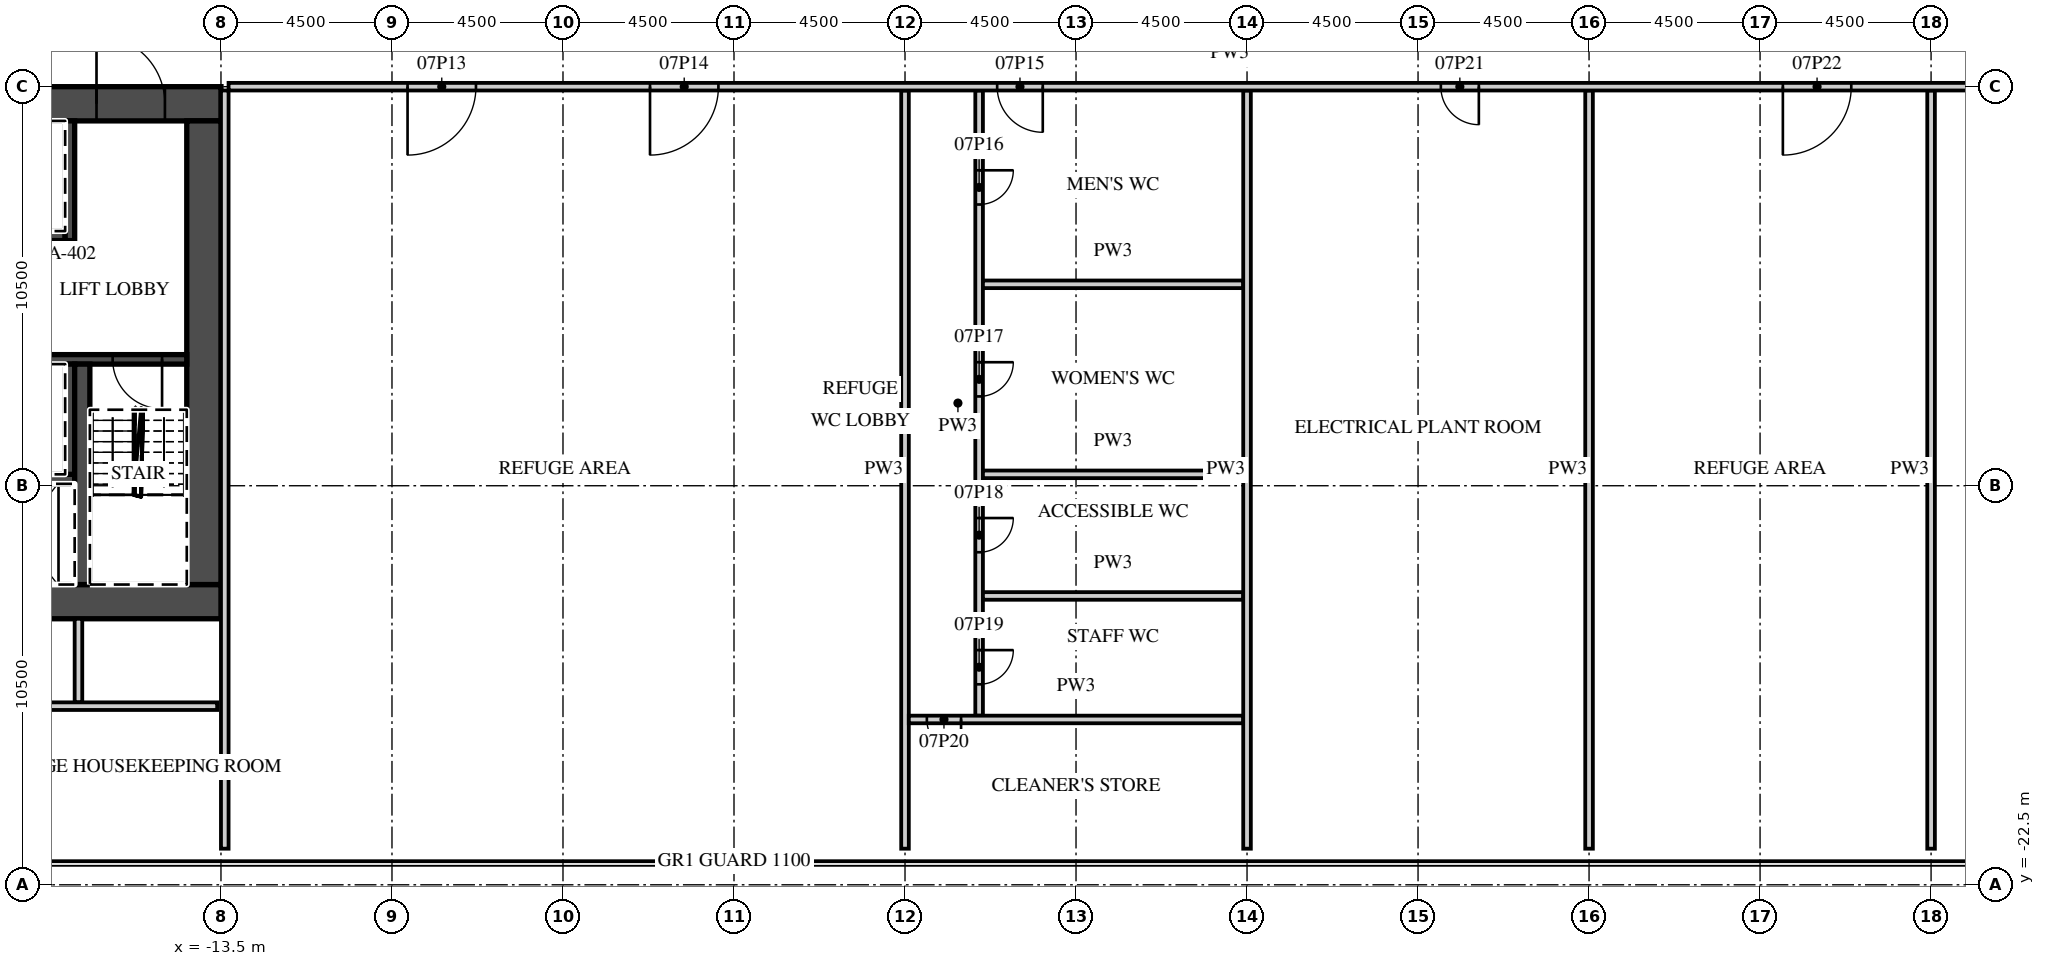
"""IFC4 building model, lengths in metres.
Left out: names, types, materials, properties, quantities, classifications, styles, units other than length and angle.
Written with IfcOpenShell. Run it as: python <this file> out.ifc"""

import sys

from ifc_helpers import new_model, si_unit, direction, frame, frame_2d, origin, place, context, subcontext, project, spatial, rectangle, extrude, element, fill, save


model = new_model("IFC4")
c1 = context("Model", 3, precision=1e-05, world=origin(), true_north=direction((0.0, 1.0)))
c2 = subcontext(c1, "Body", "Model", "MODEL_VIEW")
j1 = project(units=[si_unit("LENGTHUNIT", "METRE"), si_unit("PLANEANGLEUNIT", "RADIAN")], contexts=[c1])
p1 = place(None, origin())
s1 = spatial("IfcSite", under=j1, at=p1, CompositionType="ELEMENT")
p2 = place(p1, origin())
s2 = spatial("IfcBuilding", under=s1, at=p2, CompositionType="ELEMENT")
p3 = place(p2, frame((0.0, 0.0, 47.0)))
s3 = spatial("IfcBuildingStorey", under=s2, at=p3, CompositionType="ELEMENT", Elevation=47.0)
p4 = place(p3, frame((-31.5, -1.95, 0.0), z_axis=(0.0, 0.0, 1.0), x_axis=(1.0, 0.0, 0.0)))
e1 = element("IfcWall", 1, at=p4, inside=s3, PredefinedType="SHEAR", context=c2, shape_type="SweptSolid", body=[
    extrude(rectangle(XDim=18.0, YDim=0.9, at=frame_2d((9.0, 0.0))), origin(), (0.0, 0.0, 1.0), 5.6),
])
p5 = place(p4, frame((14.725, 0.0, 0.0)))
e2 = element("IfcOpeningElement", 2, at=p5, cuts=e1, PredefinedType="OPENING", context=c2, shape_type="SweptSolid", body=[
    extrude(rectangle(XDim=1.8, YDim=2.1, at=frame_2d((0.9, 1.05))), frame((0.0, 0.46, 0.0), z_axis=(0.0, -1.0, 0.0), x_axis=(1.0, 0.0, 0.0)), (0.0, 0.0, 1.0), 0.92),
])
p6 = place(p3, frame((-20.3, -15.05, 0.0), z_axis=(0.0, 0.0, 1.0), x_axis=(1.0, 0.0, 0.0)))
e3 = element("IfcWall", 3, at=p6, inside=s3, PredefinedType="SHEAR", context=c2, shape_type="SweptSolid", body=[
    extrude(rectangle(XDim=6.8, YDim=0.9, at=frame_2d((3.4, 0.0))), origin(), (0.0, 0.0, 1.0), 5.6),
])
p7 = place(p6, frame((0.875, 0.0, 0.0)))
e4 = element("IfcOpeningElement", 4, at=p7, cuts=e3, PredefinedType="OPENING", context=c2, shape_type="SweptSolid", body=[
    extrude(rectangle(XDim=1.2, YDim=2.1, at=frame_2d((0.6, 1.05))), frame((0.0, 0.46, 0.0), z_axis=(0.0, -1.0, 0.0), x_axis=(1.0, 0.0, 0.0)), (0.0, 0.0, 1.0), 0.92),
])
p8 = place(p3, frame((-13.95, -14.6, 0.0), z_axis=(0.0, 0.0, 1.0), x_axis=(0.0, 1.0, 0.0)))
e5 = element("IfcWall", 5, at=p8, inside=s3, PredefinedType="SHEAR", context=c2, shape_type="SweptSolid", body=[
    extrude(rectangle(XDim=12.2, YDim=0.9, at=frame_2d((6.1, 0.0))), origin(), (0.0, 0.0, 1.0), 5.6),
])
p9 = place(p3, frame((-30.6, -5.425, 0.0), z_axis=(0.0, 0.0, 1.0), x_axis=(1.0, 0.0, 0.0)))
e6 = element("IfcWall", 6, at=p9, inside=s3, PredefinedType="SHEAR", context=c2, shape_type="SweptSolid", body=[
    extrude(rectangle(XDim=13.0, YDim=0.25, at=frame_2d((6.5, 0.0))), origin(), (0.0, 0.0, 1.0), 5.6),
])
p10 = place(p3, frame((-17.475, -5.55, 0.0), z_axis=(0.0, 0.0, 1.0), x_axis=(0.0, 1.0, 0.0)))
e7 = element("IfcWall", 7, at=p10, inside=s3, PredefinedType="SHEAR", context=c2, shape_type="SweptSolid", body=[
    extrude(rectangle(XDim=3.15, YDim=0.25, at=frame_2d((1.575, 0.0))), origin(), (0.0, 0.0, 1.0), 5.6),
])
p11 = place(p3, frame((-30.6, -8.675, 0.0), z_axis=(0.0, 0.0, 1.0), x_axis=(1.0, 0.0, 0.0)))
e8 = element("IfcWall", 8, at=p11, inside=s3, PredefinedType="SHEAR", context=c2, shape_type="SweptSolid", body=[
    extrude(rectangle(XDim=16.2, YDim=0.25, at=frame_2d((8.1, 0.0))), origin(), (0.0, 0.0, 1.0), 5.6),
])
p12 = place(p11, frame((0.6, 0.0, 0.0)))
e9 = element("IfcOpeningElement", 9, at=p12, cuts=e8, PredefinedType="OPENING", context=c2, shape_type="SweptSolid", body=[
    extrude(rectangle(XDim=1.2, YDim=2.1, at=frame_2d((0.6, 1.05))), frame((0.0, 0.135, 0.0), z_axis=(0.0, -1.0, 0.0), x_axis=(1.0, 0.0, 0.0)), (0.0, 0.0, 1.0), 0.27),
])
p13 = place(p11, frame((3.25, 0.0, 0.0)))
e10 = element("IfcOpeningElement", 10, at=p13, cuts=e8, PredefinedType="OPENING", context=c2, shape_type="SweptSolid", body=[
    extrude(rectangle(XDim=1.2, YDim=2.1, at=frame_2d((0.6, 1.05))), frame((0.0, 0.135, 0.0), z_axis=(0.0, -1.0, 0.0), x_axis=(1.0, 0.0, 0.0)), (0.0, 0.0, 1.0), 0.27),
])
p14 = place(p11, frame((5.9, 0.0, 0.0)))
e11 = element("IfcOpeningElement", 11, at=p14, cuts=e8, PredefinedType="OPENING", context=c2, shape_type="SweptSolid", body=[
    extrude(rectangle(XDim=1.2, YDim=2.1, at=frame_2d((0.6, 1.05))), frame((0.0, 0.135, 0.0), z_axis=(0.0, -1.0, 0.0), x_axis=(1.0, 0.0, 0.0)), (0.0, 0.0, 1.0), 0.27),
])
p15 = place(p11, frame((14.25, 0.0, 0.0)))
e12 = element("IfcOpeningElement", 12, at=p15, cuts=e8, PredefinedType="OPENING", context=c2, shape_type="SweptSolid", body=[
    extrude(rectangle(XDim=1.3, YDim=2.1, at=frame_2d((0.65, 1.05))), frame((0.0, 0.135, 0.0), z_axis=(0.0, -1.0, 0.0), x_axis=(1.0, 0.0, 0.0)), (0.0, 0.0, 1.0), 0.27),
])
p16 = place(p3, frame((-30.6, -11.825, 0.0), z_axis=(0.0, 0.0, 1.0), x_axis=(1.0, 0.0, 0.0)))
e13 = element("IfcWall", 13, at=p16, inside=s3, PredefinedType="SHEAR", context=c2, shape_type="SweptSolid", body=[
    extrude(rectangle(XDim=13.25, YDim=0.25, at=frame_2d((6.625, 0.0))), origin(), (0.0, 0.0, 1.0), 5.6),
])
p17 = place(p3, frame((-17.475, -11.7, 0.0), z_axis=(0.0, 0.0, 1.0), x_axis=(0.0, 1.0, 0.0)))
e14 = element("IfcWall", 14, at=p17, inside=s3, PredefinedType="SHEAR", context=c2, shape_type="SweptSolid", body=[
    extrude(rectangle(XDim=2.9, YDim=0.25, at=frame_2d((1.45, 0.0))), origin(), (0.0, 0.0, 1.0), 5.6),
])
p18 = place(p3, frame((-17.15, -14.6, 0.0), z_axis=(0.0, 0.0, 1.0), x_axis=(0.0, 1.0, 0.0)))
e15 = element("IfcWall", 15, at=p18, inside=s3, PredefinedType="SHEAR", context=c2, shape_type="SweptSolid", body=[
    extrude(rectangle(XDim=5.8, YDim=0.4, at=frame_2d((2.9, 0.0))), origin(), (0.0, 0.0, 1.0), 5.6),
])
p19 = place(p3, frame((-17.25, -17.7, 0.0), z_axis=(0.0, 0.0, 1.0), x_axis=(0.0, 1.0, 0.0)))
e16 = element("IfcWall", 16, at=p19, inside=s3, PredefinedType="PARTITIONING", context=c2, shape_type="SweptSolid", body=[
    extrude(rectangle(XDim=2.2, YDim=0.2, at=frame_2d((1.1, 0.0))), origin(), (0.0, 0.0, 1.0), 5.6),
])
p20 = place(p3, frame((-44.55, -17.8, 0.0), z_axis=(0.0, 0.0, 1.0), x_axis=(1.0, 0.0, 0.0)))
e17 = element("IfcWall", 17, at=p20, inside=s3, PredefinedType="PARTITIONING", context=c2, shape_type="SweptSolid", body=[
    extrude(rectangle(XDim=30.95, YDim=0.2, at=frame_2d((15.475, 0.0))), origin(), (0.0, 0.0, 1.0), 5.6),
])
p21 = place(p20, frame((12.238, 0.0, 0.0)))
e18 = element("IfcOpeningElement", 18, at=p21, cuts=e17, PredefinedType="OPENING", context=c2, shape_type="SweptSolid", body=[
    extrude(rectangle(XDim=0.9, YDim=2.1, at=frame_2d((0.45, 1.05))), frame((0.0, 0.11, 0.0), z_axis=(0.0, -1.0, 0.0), x_axis=(1.0, 0.0, 0.0)), (0.0, 0.0, 1.0), 0.22),
])
p22 = place(p20, frame((20.538, 0.0, 0.0)))
e19 = element("IfcOpeningElement", 19, at=p22, cuts=e17, PredefinedType="OPENING", context=c2, shape_type="SweptSolid", body=[
    extrude(rectangle(XDim=0.9, YDim=2.1, at=frame_2d((0.45, 1.05))), frame((0.0, 0.11, 0.0), z_axis=(0.0, -1.0, 0.0), x_axis=(1.0, 0.0, 0.0)), (0.0, 0.0, 1.0), 0.22),
])
p23 = place(p3, frame((4.5, -21.55, 0.0), z_axis=(0.0, 0.0, 1.0), x_axis=(0.0, 1.0, 0.0)))
e20 = element("IfcWall", 20, at=p23, inside=s3, PredefinedType="PARTITIONING", context=c2, shape_type="SweptSolid", body=[
    extrude(rectangle(XDim=19.95, YDim=0.2, at=frame_2d((9.975, 0.0))), origin(), (0.0, 0.0, 1.0), 5.6),
])
p24 = place(p3, frame((6.45, -18.05, 0.0), z_axis=(0.0, 0.0, 1.0), x_axis=(0.0, 1.0, 0.0)))
e21 = element("IfcWall", 21, at=p24, inside=s3, PredefinedType="PARTITIONING", context=c2, shape_type="SweptSolid", body=[
    extrude(rectangle(XDim=16.45, YDim=0.2, at=frame_2d((8.225, 0.0))), origin(), (0.0, 0.0, 1.0), 5.6),
])
p25 = place(p24, frame((13.45, 0.0, 0.0)))
e22 = element("IfcOpeningElement", 22, at=p25, cuts=e21, PredefinedType="OPENING", context=c2, shape_type="SweptSolid", body=[
    extrude(rectangle(XDim=0.9, YDim=2.1, at=frame_2d((0.45, 1.05))), frame((0.0, 0.11, 0.0), z_axis=(0.0, -1.0, 0.0), x_axis=(1.0, 0.0, 0.0)), (0.0, 0.0, 1.0), 0.22),
])
p26 = place(p24, frame((8.4, 0.0, 0.0)))
e23 = element("IfcOpeningElement", 23, at=p26, cuts=e21, PredefinedType="OPENING", context=c2, shape_type="SweptSolid", body=[
    extrude(rectangle(XDim=0.9, YDim=2.1, at=frame_2d((0.45, 1.05))), frame((0.0, 0.11, 0.0), z_axis=(0.0, -1.0, 0.0), x_axis=(1.0, 0.0, 0.0)), (0.0, 0.0, 1.0), 0.22),
])
p27 = place(p24, frame((4.3, 0.0, 0.0)))
e24 = element("IfcOpeningElement", 24, at=p27, cuts=e21, PredefinedType="OPENING", context=c2, shape_type="SweptSolid", body=[
    extrude(rectangle(XDim=0.9, YDim=2.1, at=frame_2d((0.45, 1.05))), frame((0.0, 0.11, 0.0), z_axis=(0.0, -1.0, 0.0), x_axis=(1.0, 0.0, 0.0)), (0.0, 0.0, 1.0), 0.22),
])
p28 = place(p24, frame((0.825, 0.0, 0.0)))
e25 = element("IfcOpeningElement", 25, at=p28, cuts=e21, PredefinedType="OPENING", context=c2, shape_type="SweptSolid", body=[
    extrude(rectangle(XDim=0.9, YDim=2.1, at=frame_2d((0.45, 1.05))), frame((0.0, 0.11, 0.0), z_axis=(0.0, -1.0, 0.0), x_axis=(1.0, 0.0, 0.0)), (0.0, 0.0, 1.0), 0.22),
])
for number, where, z_axis, x_axis in (
    (26, (6.55, -6.7, 0.0), (0.0, 0.0, 1.0), (1.0, 0.0, 0.0)),
    (27, (6.55, -11.7, 0.0), (0.0, 0.0, 1.0), (1.0, 0.0, 0.0)),
    (28, (6.55, -14.9, 0.0), (0.0, 0.0, 1.0), (1.0, 0.0, 0.0)),
):
    element("IfcWall", number, at=place(p3, frame(where, z_axis=z_axis, x_axis=x_axis)), inside=s3, PredefinedType="PARTITIONING", context=c2, shape_type="SweptSolid", body=[
        extrude(rectangle(XDim=6.85, YDim=0.2, at=frame_2d((3.425, 0.0))), origin(), (0.0, 0.0, 1.0), 5.6),
    ])
p29 = place(p3, frame((4.6, -18.15, 0.0), z_axis=(0.0, 0.0, 1.0), x_axis=(1.0, 0.0, 0.0)))
e29 = element("IfcWall", 29, at=p29, inside=s3, PredefinedType="PARTITIONING", context=c2, shape_type="SweptSolid", body=[
    extrude(rectangle(XDim=8.8, YDim=0.2, at=frame_2d((4.4, 0.0))), origin(), (0.0, 0.0, 1.0), 5.6),
])
p30 = place(p29, frame((0.475, 0.0, 0.0)))
e30 = element("IfcOpeningElement", 30, at=p30, cuts=e29, PredefinedType="OPENING", context=c2, shape_type="SweptSolid", body=[
    extrude(rectangle(XDim=0.9, YDim=2.1, at=frame_2d((0.45, 1.05))), frame((0.0, 0.11, 0.0), z_axis=(0.0, -1.0, 0.0), x_axis=(1.0, 0.0, 0.0)), (0.0, 0.0, 1.0), 0.22),
])
for number, where, z_axis, x_axis in (
    (31, (13.5, -21.55, 0.0), (0.0, 0.0, 1.0), (0.0, 1.0, 0.0)),
    (32, (22.5, -21.55, 0.0), (0.0, 0.0, 1.0), (0.0, 1.0, 0.0)),
    (33, (31.5, -21.55, 0.0), (0.0, 0.0, 1.0), (0.0, 1.0, 0.0)),
):
    element("IfcWall", number, at=place(p3, frame(where, z_axis=z_axis, x_axis=x_axis)), inside=s3, PredefinedType="PARTITIONING", context=c2, shape_type="SweptSolid", body=[
        extrude(rectangle(XDim=19.95, YDim=0.2, at=frame_2d((9.975, 0.0))), origin(), (0.0, 0.0, 1.0), 5.6),
    ])
p31 = place(p3, frame((-13.3, -1.5, 0.0), z_axis=(0.0, 0.0, 1.0), x_axis=(1.0, 0.0, 0.0)))
e34 = element("IfcWall", 34, at=p31, inside=s3, PredefinedType="PARTITIONING", context=c2, shape_type="SweptSolid", body=[
    extrude(rectangle(XDim=52.7, YDim=0.2, at=frame_2d((26.35, 0.0))), origin(), (0.0, 0.0, 1.0), 5.6),
])
p32 = place(p31, frame((4.71, 0.0, 0.0)))
e35 = element("IfcOpeningElement", 35, at=p32, cuts=e34, PredefinedType="OPENING", context=c2, shape_type="SweptSolid", body=[
    extrude(rectangle(XDim=1.8, YDim=2.1, at=frame_2d((0.9, 1.05))), frame((0.0, 0.11, 0.0), z_axis=(0.0, -1.0, 0.0), x_axis=(1.0, 0.0, 0.0)), (0.0, 0.0, 1.0), 0.22),
])
p33 = place(p31, frame((11.09, 0.0, 0.0)))
e36 = element("IfcOpeningElement", 36, at=p33, cuts=e34, PredefinedType="OPENING", context=c2, shape_type="SweptSolid", body=[
    extrude(rectangle(XDim=1.8, YDim=2.1, at=frame_2d((0.9, 1.05))), frame((0.0, 0.11, 0.0), z_axis=(0.0, -1.0, 0.0), x_axis=(1.0, 0.0, 0.0)), (0.0, 0.0, 1.0), 0.22),
])
p34 = place(p31, frame((20.225, 0.0, 0.0)))
e37 = element("IfcOpeningElement", 37, at=p34, cuts=e34, PredefinedType="OPENING", context=c2, shape_type="SweptSolid", body=[
    extrude(rectangle(XDim=1.2, YDim=2.1, at=frame_2d((0.6, 1.05))), frame((0.0, 0.11, 0.0), z_axis=(0.0, -1.0, 0.0), x_axis=(1.0, 0.0, 0.0)), (0.0, 0.0, 1.0), 0.22),
])
p35 = place(p31, frame((31.9, 0.0, 0.0)))
e38 = element("IfcOpeningElement", 38, at=p35, cuts=e34, PredefinedType="OPENING", context=c2, shape_type="SweptSolid", body=[
    extrude(rectangle(XDim=1.0, YDim=2.1, at=frame_2d((0.5, 1.05))), frame((0.0, 0.11, 0.0), z_axis=(0.0, -1.0, 0.0), x_axis=(1.0, 0.0, 0.0)), (0.0, 0.0, 1.0), 0.22),
])
p36 = place(p31, frame((40.9, 0.0, 0.0)))
e39 = element("IfcOpeningElement", 39, at=p36, cuts=e34, PredefinedType="OPENING", context=c2, shape_type="SweptSolid", body=[
    extrude(rectangle(XDim=1.8, YDim=2.1, at=frame_2d((0.9, 1.05))), frame((0.0, 0.11, 0.0), z_axis=(0.0, -1.0, 0.0), x_axis=(1.0, 0.0, 0.0)), (0.0, 0.0, 1.0), 0.22),
])
p37 = place(p31, frame((47.7, 0.0, 0.0)))
e40 = element("IfcOpeningElement", 40, at=p37, cuts=e34, PredefinedType="OPENING", context=c2, shape_type="SweptSolid", body=[
    extrude(rectangle(XDim=1.0, YDim=2.1, at=frame_2d((0.5, 1.05))), frame((0.0, 0.11, 0.0), z_axis=(0.0, -1.0, 0.0), x_axis=(1.0, 0.0, 0.0)), (0.0, 0.0, 1.0), 0.22),
])
p38 = place(p3, frame((-13.4, -21.55, 0.0), z_axis=(0.0, 0.0, 1.0), x_axis=(0.0, 1.0, 0.0)))
e41 = element("IfcWall", 41, at=p38, inside=s3, PredefinedType="PARTITIONING", context=c2, shape_type="SweptSolid", body=[
    extrude(rectangle(XDim=19.95, YDim=0.2, at=frame_2d((9.975, 0.0))), origin(), (0.0, 0.0, 1.0), 5.6),
])
p39 = place(p5, origin())
e42 = element("IfcDoor", 42, at=p39, inside=s3, OperationType="DOUBLE_DOOR_DOUBLE_SWING", PredefinedType="DOOR", context=c2, shape_type="SweptSolid", body=[
    extrude(rectangle(XDim=1.8, YDim=2.1, at=frame_2d((0.9, 1.05))), frame((0.0, 0.025, 0.0), z_axis=(0.0, -1.0, 0.0), x_axis=(1.0, 0.0, 0.0)), (0.0, 0.0, 1.0), 0.05),
])
fill(e2, e42)
p40 = place(p15, origin())
e43 = element("IfcDoor", 43, at=p40, inside=s3, OperationType="SINGLE_SWING_RIGHT", PredefinedType="DOOR", context=c2, shape_type="SweptSolid", body=[
    extrude(rectangle(XDim=1.3, YDim=2.1, at=frame_2d((0.65, 1.05))), frame((0.0, 0.025, 0.0), z_axis=(0.0, -1.0, 0.0), x_axis=(1.0, 0.0, 0.0)), (0.0, 0.0, 1.0), 0.05),
])
fill(e12, e43)
p41 = place(p32, origin())
e44 = element("IfcDoor", 44, at=p41, inside=s3, OperationType="DOUBLE_DOOR_DOUBLE_SWING", PredefinedType="DOOR", context=c2, shape_type="SweptSolid", body=[
    extrude(rectangle(XDim=1.8, YDim=2.1, at=frame_2d((0.9, 1.05))), frame((0.0, 0.025, 0.0), z_axis=(0.0, -1.0, 0.0), x_axis=(1.0, 0.0, 0.0)), (0.0, 0.0, 1.0), 0.05),
])
fill(e35, e44)
p42 = place(p33, origin())
e45 = element("IfcDoor", 45, at=p42, inside=s3, OperationType="DOUBLE_DOOR_DOUBLE_SWING", PredefinedType="DOOR", context=c2, shape_type="SweptSolid", body=[
    extrude(rectangle(XDim=1.8, YDim=2.1, at=frame_2d((0.9, 1.05))), frame((0.0, 0.025, 0.0), z_axis=(0.0, -1.0, 0.0), x_axis=(1.0, 0.0, 0.0)), (0.0, 0.0, 1.0), 0.05),
])
fill(e36, e45)
p43 = place(p34, origin())
e46 = element("IfcDoor", 46, at=p43, inside=s3, OperationType="SINGLE_SWING_RIGHT", PredefinedType="DOOR", context=c2, shape_type="SweptSolid", body=[
    extrude(rectangle(XDim=1.2, YDim=2.1, at=frame_2d((0.6, 1.05))), frame((0.0, 0.025, 0.0), z_axis=(0.0, -1.0, 0.0), x_axis=(1.0, 0.0, 0.0)), (0.0, 0.0, 1.0), 0.05),
])
fill(e37, e46)
p44 = place(p25, origin())
e47 = element("IfcDoor", 47, at=p44, inside=s3, OperationType="SINGLE_SWING_RIGHT", PredefinedType="DOOR", context=c2, shape_type="SweptSolid", body=[
    extrude(rectangle(XDim=0.9, YDim=2.1, at=frame_2d((0.45, 1.05))), frame((0.0, 0.025, 0.0), z_axis=(0.0, -1.0, 0.0), x_axis=(1.0, 0.0, 0.0)), (0.0, 0.0, 1.0), 0.05),
])
fill(e22, e47)
p45 = place(p26, origin())
e48 = element("IfcDoor", 48, at=p45, inside=s3, OperationType="SINGLE_SWING_RIGHT", PredefinedType="DOOR", context=c2, shape_type="SweptSolid", body=[
    extrude(rectangle(XDim=0.9, YDim=2.1, at=frame_2d((0.45, 1.05))), frame((0.0, 0.025, 0.0), z_axis=(0.0, -1.0, 0.0), x_axis=(1.0, 0.0, 0.0)), (0.0, 0.0, 1.0), 0.05),
])
fill(e23, e48)
p46 = place(p27, origin())
e49 = element("IfcDoor", 49, at=p46, inside=s3, OperationType="SINGLE_SWING_RIGHT", PredefinedType="DOOR", context=c2, shape_type="SweptSolid", body=[
    extrude(rectangle(XDim=0.9, YDim=2.1, at=frame_2d((0.45, 1.05))), frame((0.0, 0.025, 0.0), z_axis=(0.0, -1.0, 0.0), x_axis=(1.0, 0.0, 0.0)), (0.0, 0.0, 1.0), 0.05),
])
fill(e24, e49)
p47 = place(p28, origin())
e50 = element("IfcDoor", 50, at=p47, inside=s3, OperationType="SINGLE_SWING_RIGHT", PredefinedType="DOOR", context=c2, shape_type="SweptSolid", body=[
    extrude(rectangle(XDim=0.9, YDim=2.1, at=frame_2d((0.45, 1.05))), frame((0.0, 0.025, 0.0), z_axis=(0.0, -1.0, 0.0), x_axis=(1.0, 0.0, 0.0)), (0.0, 0.0, 1.0), 0.05),
])
fill(e25, e50)
p48 = place(p30, origin())
e51 = element("IfcDoor", 51, at=p48, inside=s3, OperationType="SINGLE_SWING_RIGHT", PredefinedType="DOOR", context=c2, shape_type="SweptSolid", body=[
    extrude(rectangle(XDim=0.9, YDim=2.1, at=frame_2d((0.45, 1.05))), frame((0.0, 0.025, 0.0), z_axis=(0.0, -1.0, 0.0), x_axis=(1.0, 0.0, 0.0)), (0.0, 0.0, 1.0), 0.05),
])
fill(e30, e51)
p49 = place(p35, origin())
e52 = element("IfcDoor", 52, at=p49, inside=s3, OperationType="SINGLE_SWING_RIGHT", PredefinedType="DOOR", context=c2, shape_type="SweptSolid", body=[
    extrude(rectangle(XDim=1.0, YDim=2.1, at=frame_2d((0.5, 1.05))), frame((0.0, 0.025, 0.0), z_axis=(0.0, -1.0, 0.0), x_axis=(1.0, 0.0, 0.0)), (0.0, 0.0, 1.0), 0.05),
])
fill(e38, e52)
p50 = place(p36, origin())
e53 = element("IfcDoor", 53, at=p50, inside=s3, OperationType="DOUBLE_DOOR_DOUBLE_SWING", PredefinedType="DOOR", context=c2, shape_type="SweptSolid", body=[
    extrude(rectangle(XDim=1.8, YDim=2.1, at=frame_2d((0.9, 1.05))), frame((0.0, 0.025, 0.0), z_axis=(0.0, -1.0, 0.0), x_axis=(1.0, 0.0, 0.0)), (0.0, 0.0, 1.0), 0.05),
])
fill(e39, e53)
save(model, sys.argv[1])
